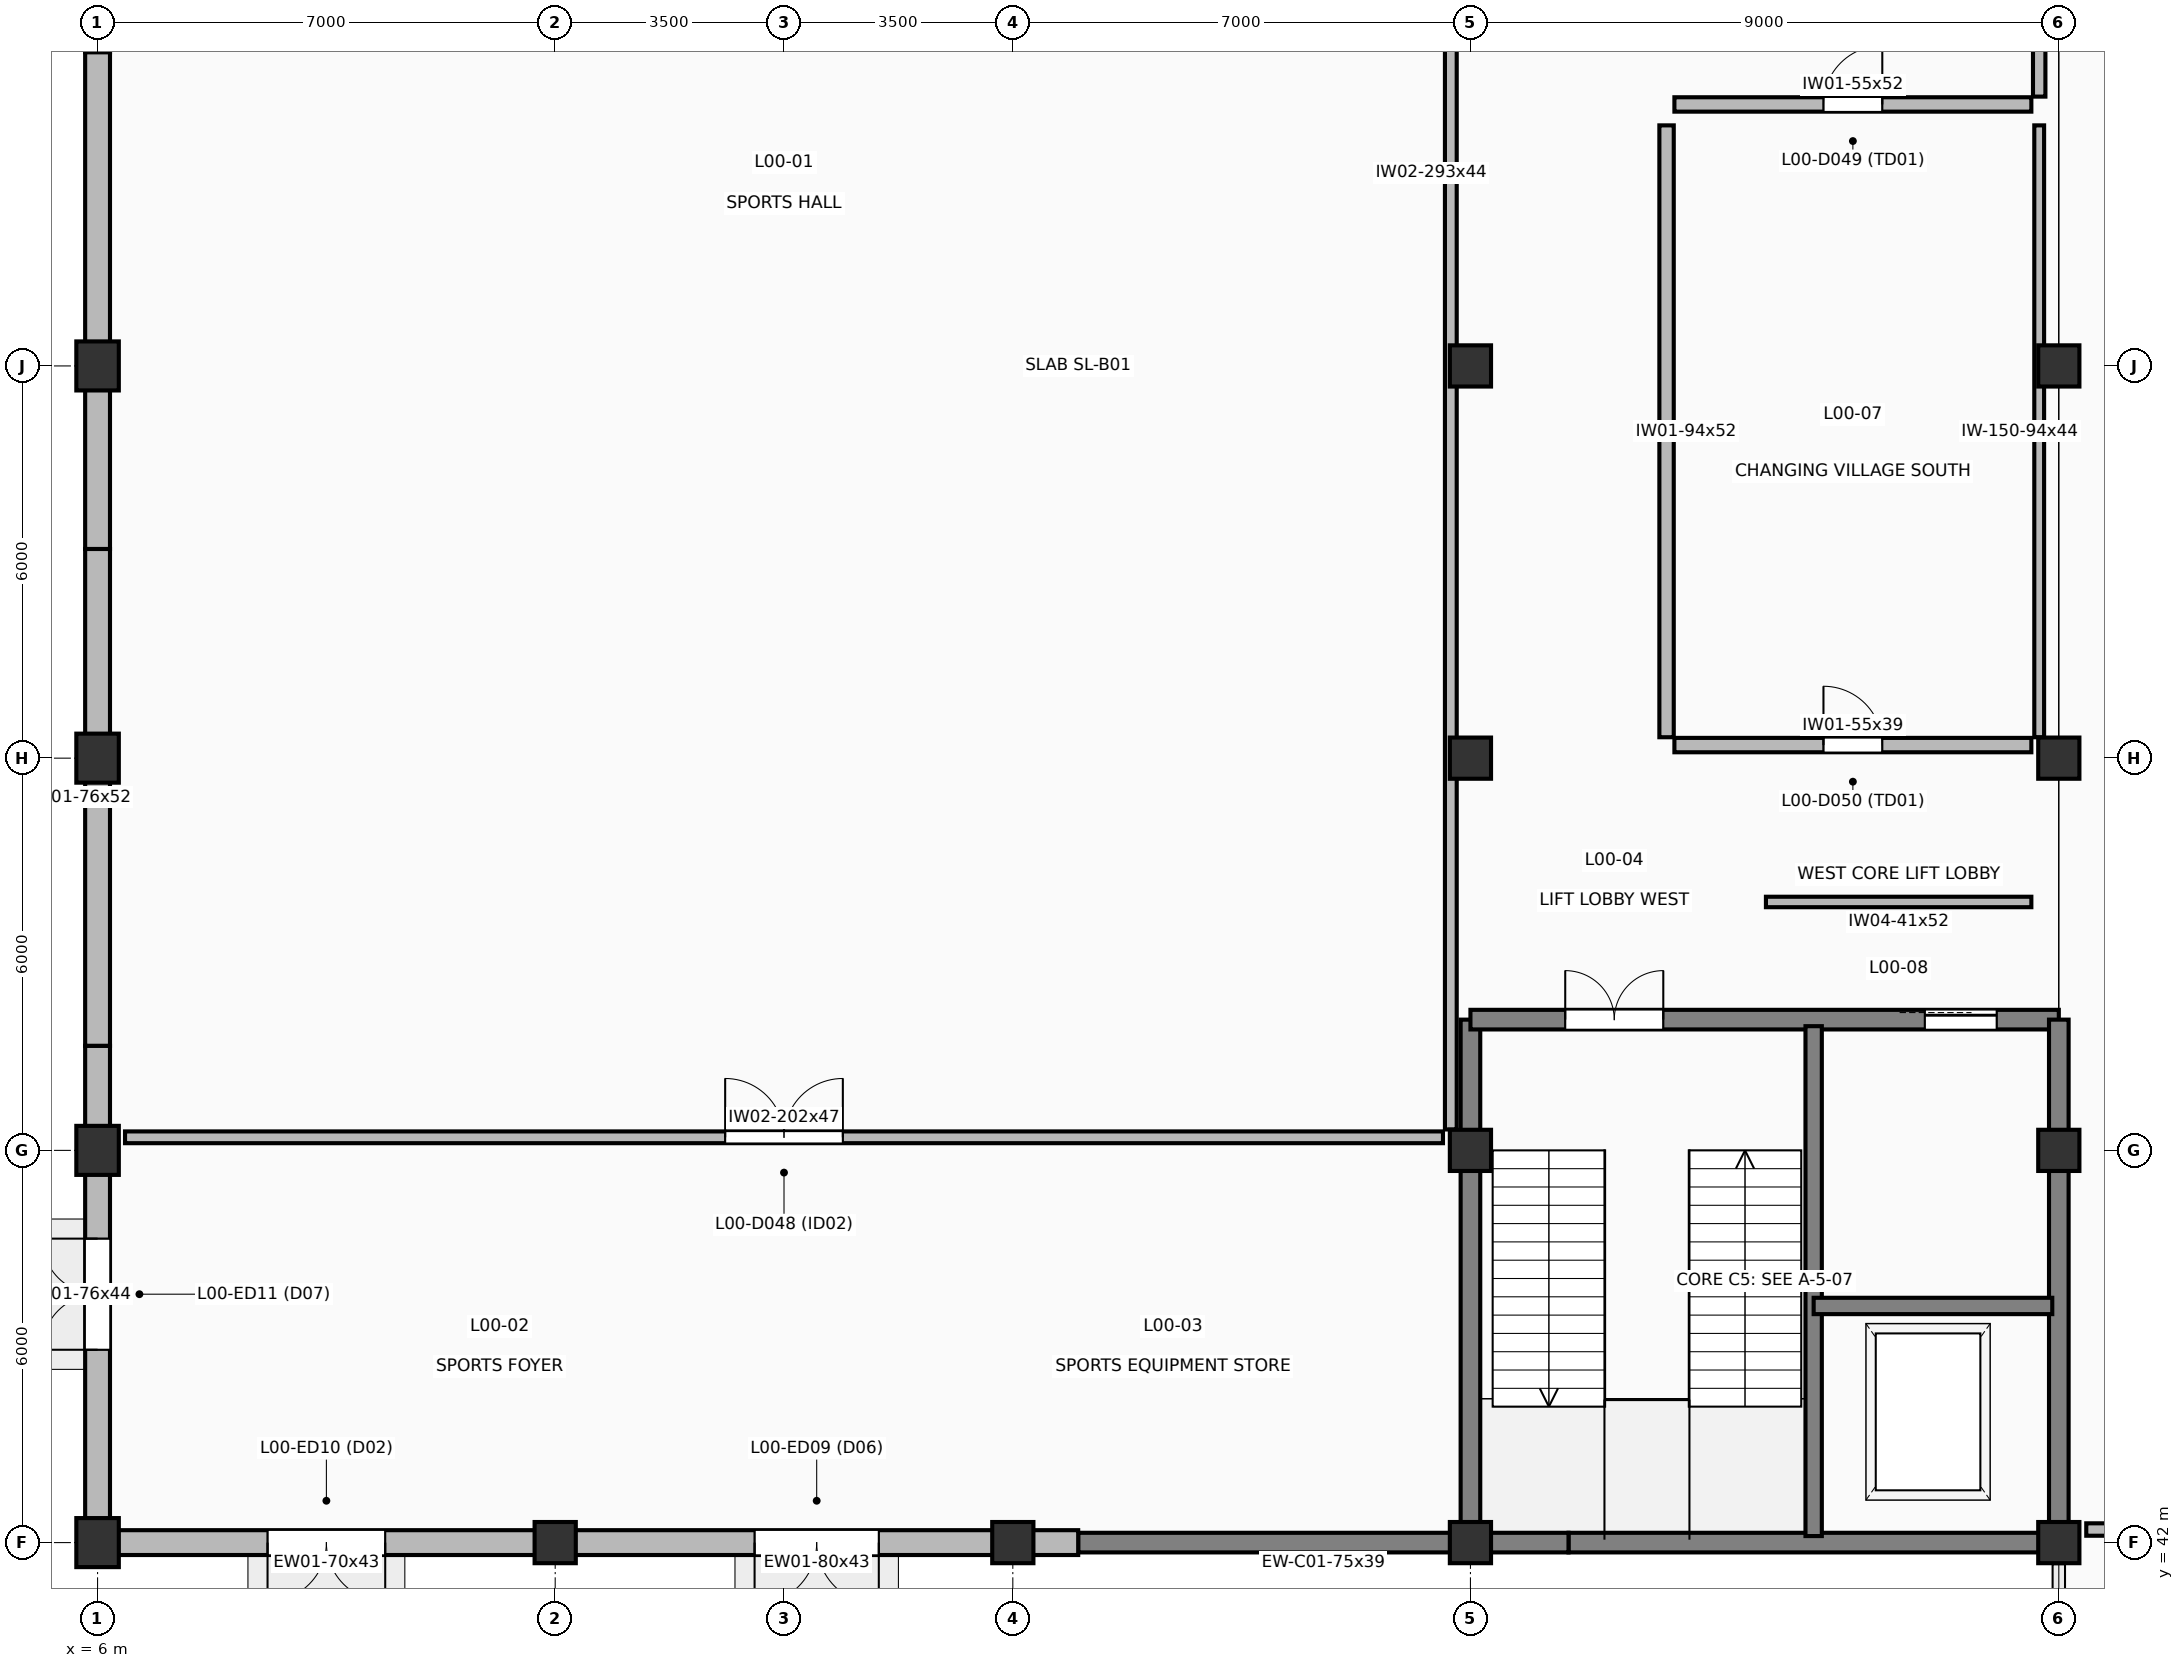
"""IFC4 building model, lengths in metres.
Left out: names, types, materials, properties, quantities, classifications, styles, units other than length and angle.
Written with IfcOpenShell. Run it as: python <this file> out.ifc"""

import sys

from ifc_helpers import new_model, si_unit, direction, frame, frame_2d, origin, origin_2d, place, context, subcontext, project, spatial, rectangle, extrude, element, fill, save


model = new_model("IFC4")
c1 = context("Model", 3, precision=1e-05, world=origin(), true_north=direction((0.0, 1.0)))
c2 = subcontext(c1, "Body", "Model", "MODEL_VIEW")
j1 = project(units=[si_unit("LENGTHUNIT", "METRE"), si_unit("PLANEANGLEUNIT", "RADIAN")], contexts=[c1])
p1 = place(None, origin())
s1 = spatial("IfcSite", under=j1, at=p1, CompositionType="ELEMENT")
p2 = place(p1, origin())
s2 = spatial("IfcBuilding", under=s1, at=p2, CompositionType="ELEMENT")
p3 = place(p2, origin())
s3 = spatial("IfcBuildingStorey", under=s2, at=p3, CompositionType="ELEMENT", Elevation=0.0)
for number, where, z_axis, x_axis in (
    (1, (6.0, 42.0, 0.0), (0.0, 0.0, 1.0), (1.0, 0.0, 0.0)),
    (2, (6.0, 48.0, 0.0), (0.0, 0.0, 1.0), (1.0, 0.0, 0.0)),
    (3, (6.0, 54.0, 0.0), (0.0, 0.0, 1.0), (1.0, 0.0, 0.0)),
    (4, (6.0, 60.0, 0.0), (0.0, 0.0, 1.0), (1.0, 0.0, 0.0)),
):
    element("IfcColumn", number, at=place(p3, frame(where, z_axis=z_axis, x_axis=x_axis)), inside=s3, PredefinedType="PILASTER", context=c2, shape_type="SweptSolid", body=[
        extrude(rectangle(XDim=0.65, YDim=0.75, at=origin_2d()), origin(), (0.0, 0.0, 1.0), 5.4),
    ])
for number, where, z_axis, x_axis in (
    (5, (13.0, 42.0, 0.0), (0.0, 0.0, 1.0), (1.0, 0.0, 0.0)),
    (6, (20.0, 42.0, 0.0), (0.0, 0.0, 1.0), (1.0, 0.0, 0.0)),
    (7, (27.0, 42.0, 0.0), (0.0, 0.0, 1.0), (1.0, 0.0, 0.0)),
    (8, (27.0, 48.0, 0.0), (0.0, 0.0, 1.0), (1.0, 0.0, 0.0)),
    (9, (27.0, 54.0, 0.0), (0.0, 0.0, 1.0), (1.0, 0.0, 0.0)),
    (10, (27.0, 60.0, 0.0), (0.0, 0.0, 1.0), (1.0, 0.0, 0.0)),
    (11, (36.0, 42.0, 0.0), (0.0, 0.0, 1.0), (1.0, 0.0, 0.0)),
    (12, (36.0, 48.0, 0.0), (0.0, 0.0, 1.0), (1.0, 0.0, 0.0)),
    (13, (36.0, 54.0, 0.0), (0.0, 0.0, 1.0), (1.0, 0.0, 0.0)),
    (14, (36.0, 60.0, 0.0), (0.0, 0.0, 1.0), (1.0, 0.0, 0.0)),
):
    element("IfcColumn", number, at=place(p3, frame(where, z_axis=z_axis, x_axis=x_axis)), inside=s3, PredefinedType="COLUMN", context=c2, shape_type="SweptSolid", body=[
        extrude(rectangle(XDim=0.63, YDim=0.63, at=origin_2d()), origin(), (0.0, 0.0, 1.0), 5.4),
    ])
for number, where, z_axis, x_axis in (
    (15, (36.0, 42.0, 0.0), (0.0, 0.0, 1.0), (-1.0, 0.0, 0.0)),
    (16, (28.5, 42.0, 0.0), (0.0, 0.0, 1.0), (-1.0, 0.0, 0.0)),
):
    element("IfcWall", number, at=place(p3, frame(where, z_axis=z_axis, x_axis=x_axis)), inside=s3, PredefinedType="SOLIDWALL", context=c2, shape_type="SweptSolid", body=[
        extrude(rectangle(XDim=7.5, YDim=0.3, at=frame_2d((3.75, 0.0))), origin(), (0.0, 0.0, 1.0), 5.4),
    ])
p4 = place(p3, frame((21.0, 42.0, 0.0), z_axis=(0.0, 0.0, 1.0), x_axis=(-1.0, 0.0, 0.0)))
e17 = element("IfcWall", 17, at=p4, inside=s3, PredefinedType="SOLIDWALL", context=c2, shape_type="SweptSolid", body=[
    extrude(rectangle(XDim=8.0, YDim=0.38, at=frame_2d((4.0, 0.0))), origin(), (0.0, 0.0, 1.0), 4.315),
])
p5 = place(p4, frame((3.05, 0.0, 0.0)))
e18 = element("IfcOpeningElement", 18, at=p5, cuts=e17, PredefinedType="OPENING", context=c2, shape_type="SweptSolid", body=[
    extrude(rectangle(XDim=1.9, YDim=2.35, at=frame_2d((0.95, 1.175))), frame((0.0, 0.2, 0.0), z_axis=(0.0, -1.0, 0.0), x_axis=(1.0, 0.0, 0.0)), (0.0, 0.0, 1.0), 0.4),
])
p6 = place(p3, frame((13.0, 42.0, 0.0), z_axis=(0.0, 0.0, 1.0), x_axis=(-1.0, 0.0, 0.0)))
e19 = element("IfcWall", 19, at=p6, inside=s3, PredefinedType="SOLIDWALL", context=c2, shape_type="SweptSolid", body=[
    extrude(rectangle(XDim=7.0, YDim=0.38, at=frame_2d((3.5, 0.0))), origin(), (0.0, 0.0, 1.0), 4.315),
])
p7 = place(p6, frame((2.6, 0.0, 0.0)))
e20 = element("IfcOpeningElement", 20, at=p7, cuts=e19, PredefinedType="OPENING", context=c2, shape_type="SweptSolid", body=[
    extrude(rectangle(XDim=1.8, YDim=2.3, at=frame_2d((0.9, 1.15))), frame((0.0, 0.2, 0.0), z_axis=(0.0, -1.0, 0.0), x_axis=(1.0, 0.0, 0.0)), (0.0, 0.0, 1.0), 0.4),
])
p8 = place(p3, frame((6.0, 42.0, 0.0), z_axis=(0.0, 0.0, 1.0), x_axis=(0.0, 1.0, 0.0)))
e21 = element("IfcWall", 21, at=p8, inside=s3, PredefinedType="SOLIDWALL", context=c2, shape_type="SweptSolid", body=[
    extrude(rectangle(XDim=7.6, YDim=0.38, at=frame_2d((3.8, 0.0))), origin(), (0.0, 0.0, 1.0), 4.425),
])
p9 = place(p8, frame((2.95, 0.0, 0.0)))
e22 = element("IfcOpeningElement", 22, at=p9, cuts=e21, PredefinedType="OPENING", context=c2, shape_type="SweptSolid", body=[
    extrude(rectangle(XDim=1.7, YDim=2.25, at=frame_2d((0.85, 1.125))), frame((0.0, 0.2, 0.0), z_axis=(0.0, -1.0, 0.0), x_axis=(1.0, 0.0, 0.0)), (0.0, 0.0, 1.0), 0.4),
])
p10 = place(p3, frame((6.0, 49.6, 0.0), z_axis=(0.0, 0.0, 1.0), x_axis=(0.0, 1.0, 0.0)))
e23 = element("IfcWall", 23, at=p10, inside=s3, PredefinedType="SOLIDWALL", context=c2, shape_type="SweptSolid", body=[
    extrude(rectangle(XDim=7.6, YDim=0.38, at=frame_2d((3.8, 0.0))), origin(), (0.0, 0.0, 1.0), 5.16),
])
p11 = place(p3, frame((6.0, 57.2, 0.0), z_axis=(0.0, 0.0, 1.0), x_axis=(0.0, 1.0, 0.0)))
e24 = element("IfcWall", 24, at=p11, inside=s3, PredefinedType="SOLIDWALL", context=c2, shape_type="SweptSolid", body=[
    extrude(rectangle(XDim=7.6, YDim=0.38, at=frame_2d((3.8, 0.0))), origin(), (0.0, 0.0, 1.0), 5.16),
])
p12 = place(p3, frame((27.0, 42.0, 0.0), z_axis=(0.0, 0.0, 1.0), x_axis=(0.0, 1.0, 0.0)))
e25 = element("IfcWall", 25, at=p12, inside=s3, PredefinedType="SHEAR", context=c2, shape_type="SweptSolid", body=[
    extrude(rectangle(XDim=8.0, YDim=0.3, at=frame_2d((4.0, 0.0))), origin(), (0.0, 0.0, 1.0), 5.4),
])
p13 = place(p3, frame((27.0, 50.0, 0.0), z_axis=(0.0, 0.0, 1.0), x_axis=(1.0, 0.0, 0.0)))
e26 = element("IfcWall", 26, at=p13, inside=s3, PredefinedType="SHEAR", context=c2, shape_type="SweptSolid", body=[
    extrude(rectangle(XDim=9.0, YDim=0.3, at=frame_2d((4.5, 0.0))), origin(), (0.0, 0.0, 1.0), 5.4),
])
p14 = place(p13, frame((1.45, 0.0, 0.0)))
e27 = element("IfcOpeningElement", 27, at=p14, cuts=e26, PredefinedType="OPENING", context=c2, shape_type="SweptSolid", body=[
    extrude(rectangle(XDim=1.5, YDim=2.2, at=frame_2d((0.75, 1.1))), frame((0.0, 0.16, 0.0), z_axis=(0.0, -1.0, 0.0), x_axis=(1.0, 0.0, 0.0)), (0.0, 0.0, 1.0), 0.32),
])
p15 = place(p13, frame((6.95, 0.0, 0.0)))
e28 = element("IfcOpeningElement", 28, at=p15, cuts=e26, PredefinedType="OPENING", context=c2, shape_type="SweptSolid", body=[
    extrude(rectangle(XDim=1.1, YDim=2.2, at=frame_2d((0.55, 1.1))), frame((0.0, 0.16, 0.0), z_axis=(0.0, -1.0, 0.0), x_axis=(1.0, 0.0, 0.0)), (0.0, 0.0, 1.0), 0.32),
])
p16 = place(p3, frame((36.0, 50.0, 0.0), z_axis=(0.0, 0.0, 1.0), x_axis=(0.0, -1.0, 0.0)))
e29 = element("IfcWall", 29, at=p16, inside=s3, PredefinedType="SHEAR", context=c2, shape_type="SweptSolid", body=[
    extrude(rectangle(XDim=8.0, YDim=0.3, at=frame_2d((4.0, 0.0))), origin(), (0.0, 0.0, 1.0), 5.4),
])
p17 = place(p3, frame((32.25, 42.1, 0.0), z_axis=(0.0, 0.0, 1.0), x_axis=(0.0, 1.0, 0.0)))
e30 = element("IfcWall", 30, at=p17, inside=s3, PredefinedType="SHEAR", context=c2, shape_type="SweptSolid", body=[
    extrude(rectangle(XDim=7.8, YDim=0.25, at=frame_2d((3.9, 0.0))), origin(), (0.0, 0.0, 1.0), 5.4),
])
p18 = place(p3, frame((32.25, 45.62, 0.0), z_axis=(0.0, 0.0, 1.0), x_axis=(1.0, 0.0, 0.0)))
e31 = element("IfcWall", 31, at=p18, inside=s3, PredefinedType="SHEAR", context=c2, shape_type="SweptSolid", body=[
    extrude(rectangle(XDim=3.65, YDim=0.25, at=frame_2d((1.825, 0.0))), origin(), (0.0, 0.0, 1.0), 5.4),
])
p19 = place(p3, frame((6.42, 48.2, 0.0), z_axis=(0.0, 0.0, 1.0), x_axis=(1.0, 0.0, 0.0)))
e32 = element("IfcWall", 32, at=p19, inside=s3, PredefinedType="PARTITIONING", context=c2, shape_type="SweptSolid", body=[
    extrude(rectangle(XDim=20.16, YDim=0.18, at=frame_2d((10.08, 0.0))), origin(), (0.0, 0.0, 1.0), 4.728),
])
p20 = place(p19, frame((9.18, 0.0, 0.0)))
e33 = element("IfcOpeningElement", 33, at=p20, cuts=e32, PredefinedType="OPENING", context=c2, shape_type="SweptSolid", body=[
    extrude(rectangle(XDim=1.8, YDim=2.3, at=frame_2d((0.9, 1.15))), frame((0.0, 0.1, 0.0), z_axis=(0.0, -1.0, 0.0), x_axis=(1.0, 0.0, 0.0)), (0.0, 0.0, 1.0), 0.2),
])
p21 = place(p3, frame((26.7, 48.32, 0.0), z_axis=(0.0, 0.0, 1.0), x_axis=(0.0, 1.0, 0.0)))
e34 = element("IfcWall", 34, at=p21, inside=s3, PredefinedType="PARTITIONING", context=c2, shape_type="SweptSolid", body=[
    extrude(rectangle(XDim=29.26, YDim=0.18, at=frame_2d((14.63, 0.0))), origin(), (0.0, 0.0, 1.0), 4.425),
])
p22 = place(p3, frame((30.12, 64.0, 0.0), z_axis=(0.0, 0.0, 1.0), x_axis=(1.0, 0.0, 0.0)))
e35 = element("IfcWall", 35, at=p22, inside=s3, PredefinedType="SOLIDWALL", context=c2, shape_type="SweptSolid", body=[
    extrude(rectangle(XDim=5.46, YDim=0.22, at=frame_2d((2.73, 0.0))), origin(), (0.0, 0.0, 1.0), 5.16),
])
p23 = place(p22, frame((2.28, 0.0, 0.0)))
e36 = element("IfcOpeningElement", 36, at=p23, cuts=e35, PredefinedType="OPENING", context=c2, shape_type="SweptSolid", body=[
    extrude(rectangle(XDim=0.9, YDim=2.1, at=frame_2d((0.45, 1.05))), frame((0.0, 0.12, 0.0), z_axis=(0.0, -1.0, 0.0), x_axis=(1.0, 0.0, 0.0)), (0.0, 0.0, 1.0), 0.24),
])
p24 = place(p3, frame((35.7, 64.12, 0.0), z_axis=(0.0, 0.0, 1.0), x_axis=(0.0, 1.0, 0.0)))
e37 = element("IfcWall", 37, at=p24, inside=s3, PredefinedType="PARTITIONING", context=c2, shape_type="SweptSolid", body=[
    extrude(rectangle(XDim=13.46, YDim=0.19, at=frame_2d((6.73, 0.0))), origin(), (0.0, 0.0, 1.0), 4.425),
])
p25 = place(p3, frame((30.12, 54.2, 0.0), z_axis=(0.0, 0.0, 1.0), x_axis=(1.0, 0.0, 0.0)))
e38 = element("IfcWall", 38, at=p25, inside=s3, PredefinedType="SOLIDWALL", context=c2, shape_type="SweptSolid", body=[
    extrude(rectangle(XDim=5.46, YDim=0.22, at=frame_2d((2.73, 0.0))), origin(), (0.0, 0.0, 1.0), 3.945),
])
p26 = place(p25, frame((2.28, 0.0, 0.0)))
e39 = element("IfcOpeningElement", 39, at=p26, cuts=e38, PredefinedType="OPENING", context=c2, shape_type="SweptSolid", body=[
    extrude(rectangle(XDim=0.9, YDim=2.1, at=frame_2d((0.45, 1.05))), frame((0.0, 0.12, 0.0), z_axis=(0.0, -1.0, 0.0), x_axis=(1.0, 0.0, 0.0)), (0.0, 0.0, 1.0), 0.24),
])
p27 = place(p3, frame((30.0, 63.68, 0.0), z_axis=(0.0, 0.0, 1.0), x_axis=(0.0, -1.0, 0.0)))
e40 = element("IfcWall", 40, at=p27, inside=s3, PredefinedType="SOLIDWALL", context=c2, shape_type="SweptSolid", body=[
    extrude(rectangle(XDim=9.36, YDim=0.22, at=frame_2d((4.68, 0.0))), origin(), (0.0, 0.0, 1.0), 5.16),
])
p28 = place(p3, frame((35.7, 54.32, 0.0), z_axis=(0.0, 0.0, 1.0), x_axis=(0.0, 1.0, 0.0)))
e41 = element("IfcWall", 41, at=p28, inside=s3, PredefinedType="PARTITIONING", context=c2, shape_type="SweptSolid", body=[
    extrude(rectangle(XDim=9.36, YDim=0.15, at=frame_2d((4.68, 0.0))), origin(), (0.0, 0.0, 1.0), 4.425),
])
p29 = place(p3, frame((35.58, 51.8, 0.0), z_axis=(0.0, 0.0, 1.0), x_axis=(-1.0, 0.0, 0.0)))
e42 = element("IfcWall", 42, at=p29, inside=s3, PredefinedType="PLUMBINGWALL", context=c2, shape_type="SweptSolid", body=[
    extrude(rectangle(XDim=4.06, YDim=0.16, at=frame_2d((2.03, 0.0))), origin(), (0.0, 0.0, 1.0), 5.16),
])
p30 = place(p3, frame((36.42, 42.2, 0.0), z_axis=(0.0, 0.0, 1.0), x_axis=(1.0, 0.0, 0.0)))
e43 = element("IfcWall", 43, at=p30, inside=s3, PredefinedType="PARTITIONING", context=c2, shape_type="SweptSolid", body=[
    extrude(rectangle(XDim=23.16, YDim=0.19, at=frame_2d((11.58, 0.0))), origin(), (0.0, 0.0, 1.0), 4.728),
])
p31 = place(p30, frame((10.68, 0.0, 0.0)))
e44 = element("IfcOpeningElement", 44, at=p31, cuts=e43, PredefinedType="OPENING", context=c2, shape_type="SweptSolid", body=[
    extrude(rectangle(XDim=1.8, YDim=2.3, at=frame_2d((0.9, 1.15))), frame((0.0, 0.105, 0.0), z_axis=(0.0, -1.0, 0.0), x_axis=(1.0, 0.0, 0.0)), (0.0, 0.0, 1.0), 0.21),
])
p32 = place(p5, origin())
e45 = element("IfcDoor", 45, at=p32, inside=s3, OperationType="DOUBLE_DOOR_SINGLE_SWING", PredefinedType="DOOR", context=c2, shape_type="SweptSolid", body=[
    extrude(rectangle(XDim=1.9, YDim=2.35, at=frame_2d((0.95, 1.175))), frame((0.0, 0.025, 0.0), z_axis=(0.0, -1.0, 0.0), x_axis=(1.0, 0.0, 0.0)), (0.0, 0.0, 1.0), 0.05),
])
fill(e18, e45)
p33 = place(p7, origin())
e46 = element("IfcDoor", 46, at=p33, inside=s3, OperationType="DOUBLE_DOOR_SINGLE_SWING", PredefinedType="DOOR", context=c2, shape_type="SweptSolid", body=[
    extrude(rectangle(XDim=1.8, YDim=2.3, at=frame_2d((0.9, 1.15))), frame((0.0, 0.025, 0.0), z_axis=(0.0, -1.0, 0.0), x_axis=(1.0, 0.0, 0.0)), (0.0, 0.0, 1.0), 0.05),
])
fill(e20, e46)
p34 = place(p9, origin())
e47 = element("IfcDoor", 47, at=p34, inside=s3, OperationType="DOUBLE_DOOR_SINGLE_SWING", PredefinedType="DOOR", context=c2, shape_type="SweptSolid", body=[
    extrude(rectangle(XDim=1.7, YDim=2.25, at=frame_2d((0.85, 1.125))), frame((0.0, 0.025, 0.0), z_axis=(0.0, -1.0, 0.0), x_axis=(1.0, 0.0, 0.0)), (0.0, 0.0, 1.0), 0.05),
])
fill(e22, e47)
p35 = place(p14, origin())
e48 = element("IfcDoor", 48, at=p35, inside=s3, OperationType="DOUBLE_DOOR_SINGLE_SWING", PredefinedType="DOOR", context=c2, shape_type="SweptSolid", body=[
    extrude(rectangle(XDim=1.5, YDim=2.2, at=frame_2d((0.75, 1.1))), frame((0.0, 0.025, 0.0), z_axis=(0.0, -1.0, 0.0), x_axis=(1.0, 0.0, 0.0)), (0.0, 0.0, 1.0), 0.05),
])
fill(e27, e48)
p36 = place(p15, origin())
e49 = element("IfcDoor", 49, at=p36, inside=s3, OperationType="SLIDING_TO_LEFT", PredefinedType="DOOR", context=c2, shape_type="SweptSolid", body=[
    extrude(rectangle(XDim=1.1, YDim=2.2, at=frame_2d((0.55, 1.1))), frame((0.0, 0.025, 0.0), z_axis=(0.0, -1.0, 0.0), x_axis=(1.0, 0.0, 0.0)), (0.0, 0.0, 1.0), 0.05),
])
fill(e28, e49)
p37 = place(p20, origin())
e50 = element("IfcDoor", 50, at=p37, inside=s3, OperationType="DOUBLE_DOOR_SINGLE_SWING", PredefinedType="DOOR", context=c2, shape_type="SweptSolid", body=[
    extrude(rectangle(XDim=1.8, YDim=2.3, at=frame_2d((0.9, 1.15))), frame((0.0, 0.025, 0.0), z_axis=(0.0, -1.0, 0.0), x_axis=(1.0, 0.0, 0.0)), (0.0, 0.0, 1.0), 0.05),
])
fill(e33, e50)
p38 = place(p23, origin())
e51 = element("IfcDoor", 51, at=p38, inside=s3, OperationType="SINGLE_SWING_RIGHT", PredefinedType="TRAPDOOR", context=c2, shape_type="SweptSolid", body=[
    extrude(rectangle(XDim=0.9, YDim=2.1, at=frame_2d((0.45, 1.05))), frame((0.0, 0.025, 0.0), z_axis=(0.0, -1.0, 0.0), x_axis=(1.0, 0.0, 0.0)), (0.0, 0.0, 1.0), 0.05),
])
fill(e36, e51)
p39 = place(p26, origin())
e52 = element("IfcDoor", 52, at=p39, inside=s3, OperationType="SINGLE_SWING_LEFT", PredefinedType="TRAPDOOR", context=c2, shape_type="SweptSolid", body=[
    extrude(rectangle(XDim=0.9, YDim=2.1, at=frame_2d((0.45, 1.05))), frame((0.0, 0.025, 0.0), z_axis=(0.0, -1.0, 0.0), x_axis=(1.0, 0.0, 0.0)), (0.0, 0.0, 1.0), 0.05),
])
fill(e39, e52)
save(model, sys.argv[1])
